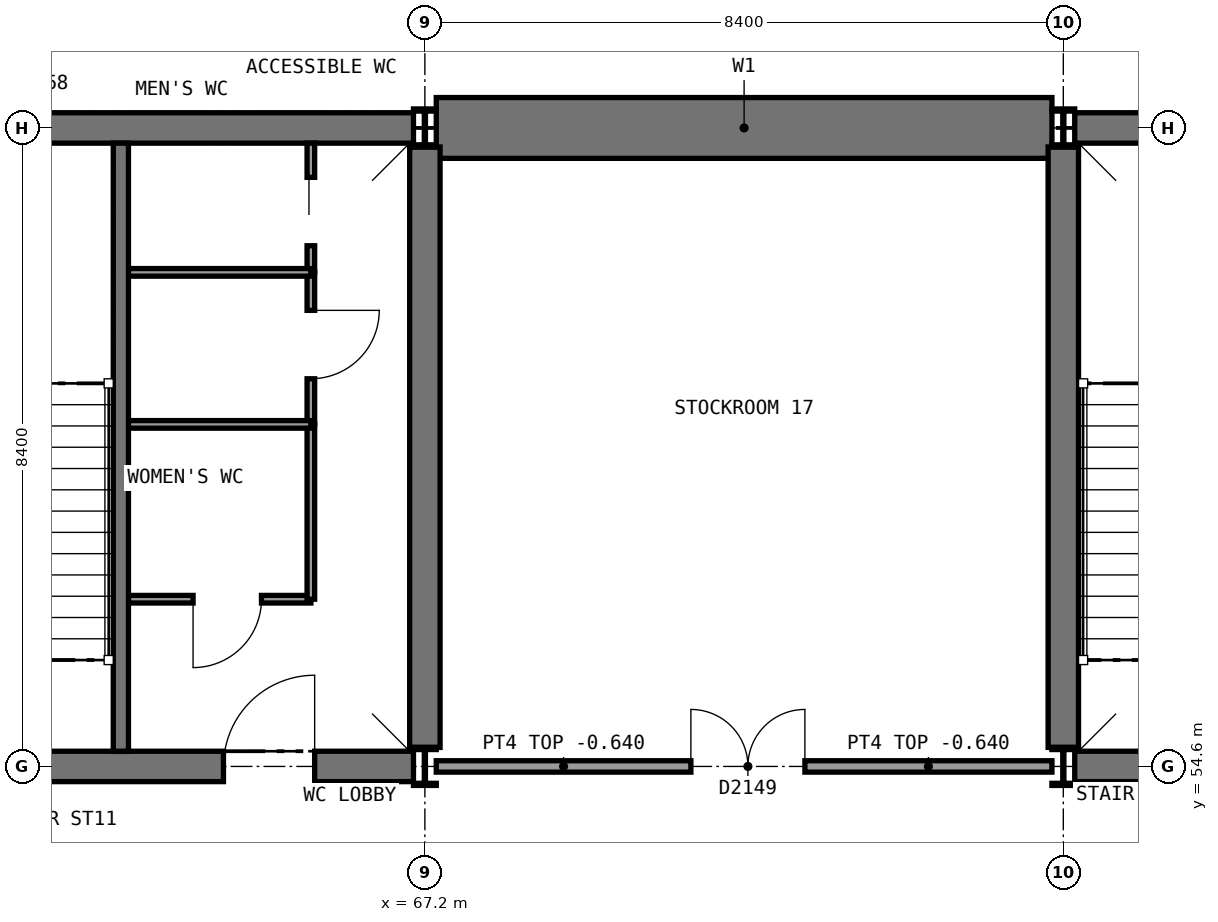
"""IFC4 building model, lengths in metres.
Left out: names, types, materials, properties, quantities, classifications, styles, units other than length and angle.
Written with IfcOpenShell. Run it as: python <this file> out.ifc"""

import sys

from ifc_helpers import new_model, si_unit, direction, frame, frame_2d, origin, origin_2d, place, context, subcontext, project, spatial, rectangle, i_section, extrude, element, fill, save


model = new_model("IFC4")
c1 = context("Model", 3, precision=1e-05, world=origin(), true_north=direction((0.0, 1.0)))
c2 = subcontext(c1, "Body", "Model", "MODEL_VIEW")
j1 = project(units=[si_unit("LENGTHUNIT", "METRE"), si_unit("PLANEANGLEUNIT", "RADIAN")], contexts=[c1])
p1 = place(None, origin())
s1 = spatial("IfcSite", under=j1, at=p1, CompositionType="ELEMENT")
p2 = place(p1, origin())
s2 = spatial("IfcBuilding", under=s1, at=p2, CompositionType="ELEMENT")
p3 = place(p2, frame((0.0, 0.0, -4.9)))
s3 = spatial("IfcBuildingStorey", under=s2, at=p3, CompositionType="ELEMENT", Elevation=-4.9)
p4 = place(p3, frame((67.35, 63.0, 0.0), z_axis=(0.0, 0.0, 1.0), x_axis=(1.0, 0.0, 0.0)))
e1 = element("IfcWall", 1, at=p4, inside=s3, PredefinedType="SOLIDWALL", context=c2, shape_type="SweptSolid", body=[
    extrude(rectangle(XDim=8.1, YDim=0.8, at=frame_2d((4.05, 0.0))), origin(), (0.0, 0.0, 1.0), 4.75),
])
p5 = place(p3, frame((75.75, 63.0, 0.0), z_axis=(0.0, 0.0, 1.0), x_axis=(1.0, 0.0, 0.0)))
e2 = element("IfcWall", 2, at=p5, inside=s3, PredefinedType="SHEAR", context=c2, shape_type="SweptSolid", body=[
    extrude(rectangle(XDim=8.097, YDim=0.4, at=frame_2d((4.048, 0.0))), origin(), (0.0, 0.0, 1.0), 4.75),
])
p6 = place(p3, frame((75.75, 54.6, 0.0), z_axis=(0.0, 0.0, 1.0), x_axis=(1.0, 0.0, 0.0)))
e3 = element("IfcWall", 3, at=p6, inside=s3, PredefinedType="SHEAR", context=c2, shape_type="SweptSolid", body=[
    extrude(rectangle(XDim=8.097, YDim=0.4, at=frame_2d((4.048, 0.0))), origin(), (0.0, 0.0, 1.0), 4.75),
])
p7 = place(p6, frame((1.15, 0.0, 0.0)))
e4 = element("IfcOpeningElement", 4, at=p7, cuts=e3, PredefinedType="OPENING", context=c2, shape_type="SweptSolid", body=[
    extrude(rectangle(XDim=1.8, YDim=2.1, at=frame_2d((0.9, 1.05))), frame((0.0, 0.21, 0.0), z_axis=(0.0, -1.0, 0.0), x_axis=(1.0, 0.0, 0.0)), (0.0, 0.0, 1.0), 0.42),
])
p8 = place(p6, frame((5.3, 0.0, 0.0)))
e5 = element("IfcOpeningElement", 5, at=p8, cuts=e3, PredefinedType="OPENING", context=c2, shape_type="SweptSolid", body=[
    extrude(rectangle(XDim=1.8, YDim=2.1, at=frame_2d((0.9, 1.05))), frame((0.0, 0.21, 0.0), z_axis=(0.0, -1.0, 0.0), x_axis=(1.0, 0.0, 0.0)), (0.0, 0.0, 1.0), 0.42),
])
p9 = place(p3, frame((75.6, 54.85, 0.0), z_axis=(0.0, 0.0, 1.0), x_axis=(0.0, 1.0, 0.0)))
e6 = element("IfcWall", 6, at=p9, inside=s3, PredefinedType="SHEAR", context=c2, shape_type="SweptSolid", body=[
    extrude(rectangle(XDim=7.9, YDim=0.4, at=frame_2d((3.95, 0.0))), origin(), (0.0, 0.0, 1.0), 4.75),
])
p10 = place(p3, frame((58.95, 63.0, 0.0), z_axis=(0.0, 0.0, 1.0), x_axis=(1.0, 0.0, 0.0)))
e7 = element("IfcWall", 7, at=p10, inside=s3, PredefinedType="SHEAR", context=c2, shape_type="SweptSolid", body=[
    extrude(rectangle(XDim=8.1, YDim=0.4, at=frame_2d((4.05, 0.0))), origin(), (0.0, 0.0, 1.0), 4.75),
])
p11 = place(p3, frame((58.95, 54.6, 0.0), z_axis=(0.0, 0.0, 1.0), x_axis=(1.0, 0.0, 0.0)))
e8 = element("IfcWall", 8, at=p11, inside=s3, PredefinedType="SHEAR", context=c2, shape_type="SweptSolid", body=[
    extrude(rectangle(XDim=8.1, YDim=0.4, at=frame_2d((4.05, 0.0))), origin(), (0.0, 0.0, 1.0), 4.75),
])
p12 = place(p11, frame((1.15, 0.0, 0.0)))
e9 = element("IfcOpeningElement", 9, at=p12, cuts=e8, PredefinedType="OPENING", context=c2, shape_type="SweptSolid", body=[
    extrude(rectangle(XDim=1.8, YDim=2.1, at=frame_2d((0.9, 1.05))), frame((0.0, 0.21, 0.0), z_axis=(0.0, -1.0, 0.0), x_axis=(1.0, 0.0, 0.0)), (0.0, 0.0, 1.0), 0.42),
])
p13 = place(p11, frame((5.6, 0.0, 0.0)))
e10 = element("IfcOpeningElement", 10, at=p13, cuts=e8, PredefinedType="OPENING", context=c2, shape_type="SweptSolid", body=[
    extrude(rectangle(XDim=1.2, YDim=2.1, at=frame_2d((0.6, 1.05))), frame((0.0, 0.21, 0.0), z_axis=(0.0, -1.0, 0.0), x_axis=(1.0, 0.0, 0.0)), (0.0, 0.0, 1.0), 0.42),
])
p14 = place(p3, frame((67.2, 54.85, 0.0), z_axis=(0.0, 0.0, 1.0), x_axis=(0.0, 1.0, 0.0)))
e11 = element("IfcWall", 11, at=p14, inside=s3, PredefinedType="SHEAR", context=c2, shape_type="SweptSolid", body=[
    extrude(rectangle(XDim=7.9, YDim=0.4, at=frame_2d((3.95, 0.0))), origin(), (0.0, 0.0, 1.0), 4.75),
])
for number, where, z_axis, x_axis in (
    (12, (67.2, 54.6, 0.0), (0.0, 0.0, 1.0), (1.0, 0.0, 0.0)),
    (13, (67.2, 63.0, 0.0), (0.0, 0.0, 1.0), (1.0, 0.0, 0.0)),
    (14, (75.6, 54.6, 0.0), (0.0, 0.0, 1.0), (1.0, 0.0, 0.0)),
    (15, (75.6, 63.0, 0.0), (0.0, 0.0, 1.0), (1.0, 0.0, 0.0)),
):
    element("IfcColumn", number, at=place(p3, frame(where, z_axis=z_axis, x_axis=x_axis)), inside=s3, PredefinedType="COLUMN", context=c2, shape_type="SweptSolid", body=[
        extrude(i_section(OverallWidth=0.3, OverallDepth=0.5, WebThickness=0.014, FlangeThickness=0.028, FilletRadius=0.027, at=origin_2d()), origin(), (0.0, 0.0, 1.0), 4.9),
    ])
p15 = place(p3, frame((63.3, 56.8, 0.0), z_axis=(0.0, 0.0, 1.0), x_axis=(1.0, 0.0, 0.0)))
e16 = element("IfcWall", 16, at=p15, inside=s3, PredefinedType="PARTITIONING", context=c2, shape_type="SweptSolid", body=[
    extrude(rectangle(XDim=2.4, YDim=0.1, at=frame_2d((1.2, 0.0))), origin(), (0.0, 0.0, 1.0), 4.68),
])
p16 = place(p15, frame((0.85, 0.0, 0.0)))
e17 = element("IfcOpeningElement", 17, at=p16, cuts=e16, PredefinedType="OPENING", context=c2, shape_type="SweptSolid", body=[
    extrude(rectangle(XDim=0.9, YDim=2.1, at=frame_2d((0.45, 1.05))), frame((0.0, 0.06, 0.0), z_axis=(0.0, -1.0, 0.0), x_axis=(1.0, 0.0, 0.0)), (0.0, 0.0, 1.0), 0.12),
])
p17 = place(p3, frame((65.7, 56.8, 0.0), z_axis=(0.0, 0.0, 1.0), x_axis=(0.0, 1.0, 0.0)))
e18 = element("IfcWall", 18, at=p17, inside=s3, PredefinedType="PARTITIONING", context=c2, shape_type="SweptSolid", body=[
    extrude(rectangle(XDim=2.3, YDim=0.1, at=frame_2d((1.15, 0.0))), origin(), (0.0, 0.0, 1.0), 4.68),
])
p18 = place(p3, frame((65.7, 59.1, 0.0), z_axis=(0.0, 0.0, 1.0), x_axis=(0.0, 1.0, 0.0)))
e19 = element("IfcWall", 19, at=p18, inside=s3, PredefinedType="PARTITIONING", context=c2, shape_type="SweptSolid", body=[
    extrude(rectangle(XDim=2.0, YDim=0.1, at=frame_2d((1.0, 0.0))), origin(), (0.0, 0.0, 1.0), 4.68),
])
p19 = place(p18, frame((0.6, 0.0, 0.0)))
e20 = element("IfcOpeningElement", 20, at=p19, cuts=e19, PredefinedType="OPENING", context=c2, shape_type="SweptSolid", body=[
    extrude(rectangle(XDim=0.9, YDim=2.1, at=frame_2d((0.45, 1.05))), frame((0.0, 0.06, 0.0), z_axis=(0.0, -1.0, 0.0), x_axis=(1.0, 0.0, 0.0)), (0.0, 0.0, 1.0), 0.12),
])
p20 = place(p3, frame((65.7, 61.1, 0.0), z_axis=(0.0, 0.0, 1.0), x_axis=(0.0, 1.0, 0.0)))
e21 = element("IfcWall", 21, at=p20, inside=s3, PredefinedType="PARTITIONING", context=c2, shape_type="SweptSolid", body=[
    extrude(rectangle(XDim=1.7, YDim=0.1, at=frame_2d((0.85, 0.0))), origin(), (0.0, 0.0, 1.0), 4.68),
])
p21 = place(p20, frame((0.35, 0.0, 0.0)))
e22 = element("IfcOpeningElement", 22, at=p21, cuts=e21, PredefinedType="OPENING", context=c2, shape_type="SweptSolid", body=[
    extrude(rectangle(XDim=0.9, YDim=2.1, at=frame_2d((0.45, 1.05))), frame((0.0, 0.06, 0.0), z_axis=(0.0, -1.0, 0.0), x_axis=(1.0, 0.0, 0.0)), (0.0, 0.0, 1.0), 0.12),
])
for number, where, z_axis, x_axis in (
    (23, (63.3, 59.1, 0.0), (0.0, 0.0, 1.0), (1.0, 0.0, 0.0)),
    (24, (63.3, 61.1, 0.0), (0.0, 0.0, 1.0), (1.0, 0.0, 0.0)),
):
    element("IfcWall", number, at=place(p3, frame(where, z_axis=z_axis, x_axis=x_axis)), inside=s3, PredefinedType="PARTITIONING", context=c2, shape_type="SweptSolid", body=[
        extrude(rectangle(XDim=2.4, YDim=0.1, at=frame_2d((1.2, 0.0))), origin(), (0.0, 0.0, 1.0), 4.68),
    ])
p22 = place(p3, frame((67.35, 54.6, 0.0), z_axis=(0.0, 0.0, 1.0), x_axis=(1.0, 0.0, 0.0)))
e25 = element("IfcWall", 25, at=p22, inside=s3, PredefinedType="SOLIDWALL", context=c2, shape_type="SweptSolid", body=[
    extrude(rectangle(XDim=8.1, YDim=0.15, at=frame_2d((4.05, 0.0))), origin(), (0.0, 0.0, 1.0), 4.26),
])
p23 = place(p22, frame((3.35, 0.0, 0.0)))
e26 = element("IfcOpeningElement", 26, at=p23, cuts=e25, PredefinedType="OPENING", context=c2, shape_type="SweptSolid", body=[
    extrude(rectangle(XDim=1.5, YDim=2.1, at=frame_2d((0.75, 1.05))), frame((0.0, 0.085, 0.0), z_axis=(0.0, -1.0, 0.0), x_axis=(1.0, 0.0, 0.0)), (0.0, 0.0, 1.0), 0.17),
])
p24 = place(p3, frame((63.2, 62.8, 0.0), z_axis=(0.0, 0.0, 1.0), x_axis=(0.0, -1.0, 0.0)))
e27 = element("IfcWall", 27, at=p24, inside=s3, PredefinedType="SHEAR", context=c2, shape_type="SweptSolid", body=[
    extrude(rectangle(XDim=8.0, YDim=0.2, at=frame_2d((4.0, 0.0))), origin(), (0.0, 0.0, 1.0), 4.75),
])
p25 = place(p16, frame((0.9, 0.0, 0.0), z_axis=(0.0, 0.0, 1.0), x_axis=(-1.0, 0.0, 0.0)))
e28 = element("IfcDoor", 28, at=p25, inside=s3, OperationType="SINGLE_SWING_RIGHT", PredefinedType="DOOR", context=c2, shape_type="SweptSolid", body=[
    extrude(rectangle(XDim=0.9, YDim=2.1, at=frame_2d((0.45, 1.05))), frame((0.0, 0.025, 0.0), z_axis=(0.0, -1.0, 0.0), x_axis=(1.0, 0.0, 0.0)), (0.0, 0.0, 1.0), 0.05),
])
fill(e17, e28)
p26 = place(p19, frame((0.9, 0.0, 0.0), z_axis=(0.0, 0.0, 1.0), x_axis=(-1.0, 0.0, 0.0)))
e29 = element("IfcDoor", 29, at=p26, inside=s3, OperationType="SINGLE_SWING_LEFT", PredefinedType="DOOR", context=c2, shape_type="SweptSolid", body=[
    extrude(rectangle(XDim=0.9, YDim=2.1, at=frame_2d((0.45, 1.05))), frame((0.0, 0.025, 0.0), z_axis=(0.0, -1.0, 0.0), x_axis=(1.0, 0.0, 0.0)), (0.0, 0.0, 1.0), 0.05),
])
fill(e20, e29)
p27 = place(p21, origin())
e30 = element("IfcDoor", 30, at=p27, inside=s3, OperationType="SLIDING_TO_RIGHT", PredefinedType="DOOR", context=c2, shape_type="SweptSolid", body=[
    extrude(rectangle(XDim=0.9, YDim=2.1, at=frame_2d((0.45, 1.05))), frame((0.0, 0.025, 0.0), z_axis=(0.0, -1.0, 0.0), x_axis=(1.0, 0.0, 0.0)), (0.0, 0.0, 1.0), 0.05),
])
fill(e22, e30)
p28 = place(p23, origin())
e31 = element("IfcDoor", 31, at=p28, inside=s3, OperationType="DOUBLE_DOOR_SINGLE_SWING", PredefinedType="DOOR", context=c2, shape_type="SweptSolid", body=[
    extrude(rectangle(XDim=1.5, YDim=2.1, at=frame_2d((0.75, 1.05))), frame((0.0, 0.025, 0.0), z_axis=(0.0, -1.0, 0.0), x_axis=(1.0, 0.0, 0.0)), (0.0, 0.0, 1.0), 0.05),
])
fill(e26, e31)
p29 = place(p13, origin())
e32 = element("IfcDoor", 32, at=p29, inside=s3, OperationType="SINGLE_SWING_RIGHT", PredefinedType="DOOR", context=c2, shape_type="SweptSolid", body=[
    extrude(rectangle(XDim=1.2, YDim=2.1, at=frame_2d((0.6, 1.05))), frame((0.0, 0.025, 0.0), z_axis=(0.0, -1.0, 0.0), x_axis=(1.0, 0.0, 0.0)), (0.0, 0.0, 1.0), 0.05),
])
fill(e10, e32)
save(model, sys.argv[1])
